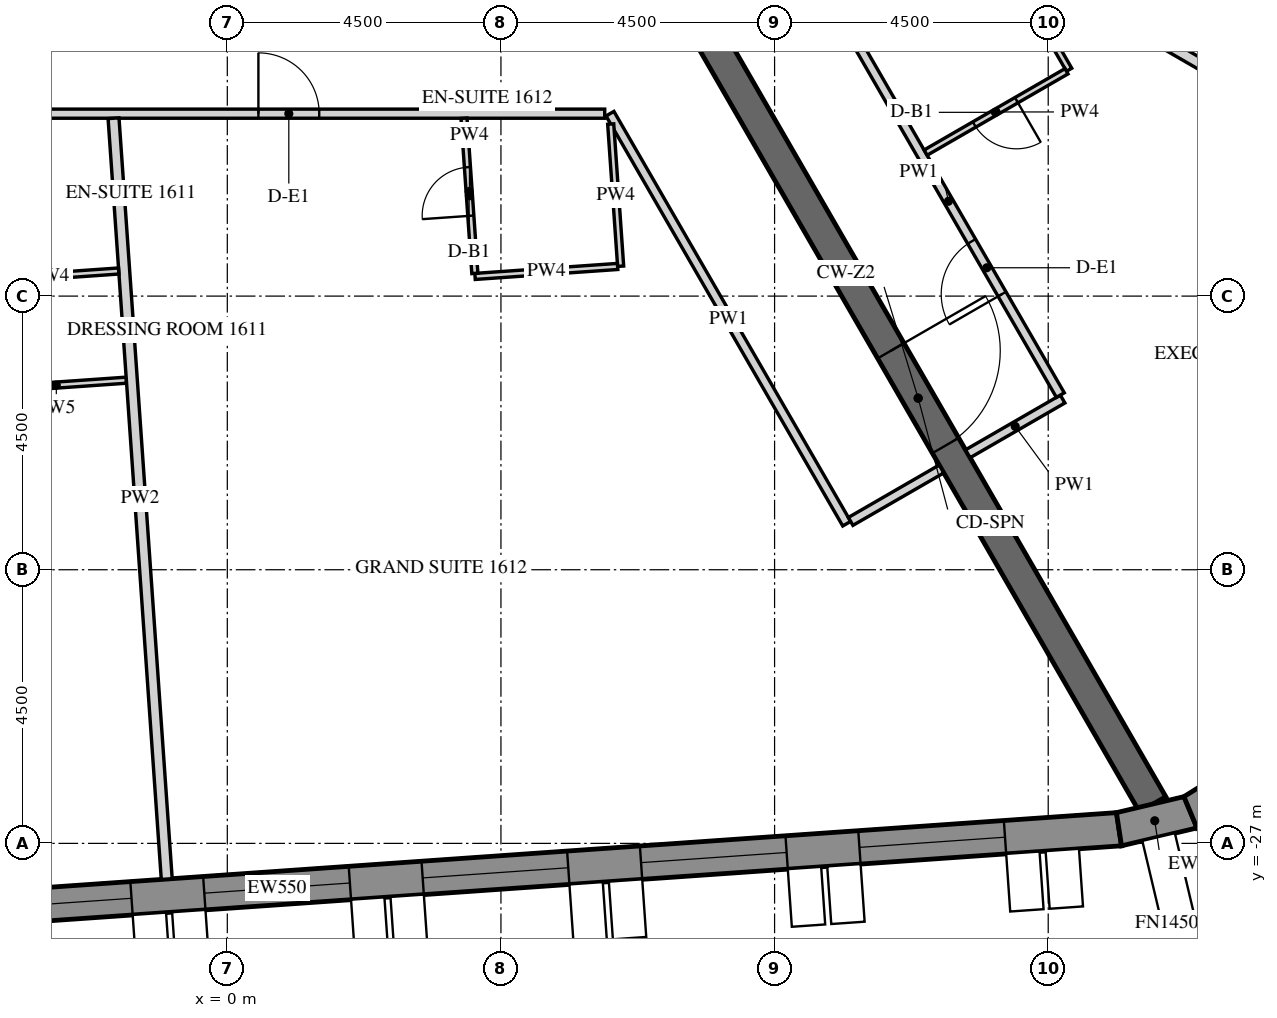
"""IFC4 building model, lengths in metres.
Left out: names, types, materials, properties, quantities, classifications, styles, units other than length and angle.
Written with IfcOpenShell. Run it as: python <this file> out.ifc"""

import sys

from ifc_helpers import new_model, si_unit, direction, frame, frame_2d, origin, place, context, subcontext, project, spatial, polyline, rectangle, outline, extrude, element, fill, save


model = new_model("IFC4")
c1 = context("Model", 3, precision=1e-05, world=origin(), true_north=direction((0.0, 1.0)))
c2 = subcontext(c1, "Body", "Model", "MODEL_VIEW")
j1 = project(units=[si_unit("LENGTHUNIT", "METRE"), si_unit("PLANEANGLEUNIT", "RADIAN")], contexts=[c1])
p1 = place(None, origin())
s1 = spatial("IfcSite", under=j1, at=p1, CompositionType="ELEMENT")
p2 = place(p1, origin())
s2 = spatial("IfcBuilding", under=s1, at=p2, CompositionType="ELEMENT")
p3 = place(p2, frame((0.0, 0.0, 207.3)))
s3 = spatial("IfcBuildingStorey", under=s2, at=p3, CompositionType="ELEMENT", Elevation=207.3)
p4 = place(p3, frame((-13.026, -28.704, -0.15), z_axis=(0.0, 0.0, 1.0), x_axis=(0.99756406806, 0.069756219185, 0.0)))
e1 = element("IfcWall", 1, at=p4, inside=s3, PredefinedType="SOLIDWALL", context=c2, shape_type="SweptSolid", body=[
    extrude(outline(polyline([(-0.026, -0.275), (27.78, -0.275), (27.735, 0.275), (0.026, 0.275), (-0.026, -0.275)])), origin(), (0.0, 0.0, 1.0), 3.9),
])
p5 = place(p4, frame((1.879, 0.0, 1.05)))
e2 = element("IfcOpeningElement", 2, at=p5, cuts=e1, PredefinedType="OPENING", context=c2, shape_type="SweptSolid", body=[
    extrude(rectangle(XDim=2.4, YDim=2.4, at=frame_2d((1.2, 1.2))), frame((0.0, 0.285, 0.0), z_axis=(0.0, -1.0, 0.0), x_axis=(1.0, 0.0, 0.0)), (0.0, 0.0, 1.0), 0.57),
])
p6 = place(p4, frame((5.479, 0.0, 1.05)))
e3 = element("IfcOpeningElement", 3, at=p6, cuts=e1, PredefinedType="OPENING", context=c2, shape_type="SweptSolid", body=[
    extrude(rectangle(XDim=2.4, YDim=2.4, at=frame_2d((1.2, 1.2))), frame((0.0, 0.285, 0.0), z_axis=(0.0, -1.0, 0.0), x_axis=(1.0, 0.0, 0.0)), (0.0, 0.0, 1.0), 0.57),
])
p7 = place(p4, frame((9.079, 0.0, 1.05)))
e4 = element("IfcOpeningElement", 4, at=p7, cuts=e1, PredefinedType="OPENING", context=c2, shape_type="SweptSolid", body=[
    extrude(rectangle(XDim=2.4, YDim=2.4, at=frame_2d((1.2, 1.2))), frame((0.0, 0.285, 0.0), z_axis=(0.0, -1.0, 0.0), x_axis=(1.0, 0.0, 0.0)), (0.0, 0.0, 1.0), 0.57),
])
p8 = place(p4, frame((12.679, 0.0, 1.05)))
e5 = element("IfcOpeningElement", 5, at=p8, cuts=e1, PredefinedType="OPENING", context=c2, shape_type="SweptSolid", body=[
    extrude(rectangle(XDim=2.4, YDim=2.4, at=frame_2d((1.2, 1.2))), frame((0.0, 0.285, 0.0), z_axis=(0.0, -1.0, 0.0), x_axis=(1.0, 0.0, 0.0)), (0.0, 0.0, 1.0), 0.57),
])
p9 = place(p4, frame((16.279, 0.0, 1.05)))
e6 = element("IfcOpeningElement", 6, at=p9, cuts=e1, PredefinedType="OPENING", context=c2, shape_type="SweptSolid", body=[
    extrude(rectangle(XDim=2.4, YDim=2.4, at=frame_2d((1.2, 1.2))), frame((0.0, 0.285, 0.0), z_axis=(0.0, -1.0, 0.0), x_axis=(1.0, 0.0, 0.0)), (0.0, 0.0, 1.0), 0.57),
])
p10 = place(p4, frame((19.879, 0.0, 1.05)))
e7 = element("IfcOpeningElement", 7, at=p10, cuts=e1, PredefinedType="OPENING", context=c2, shape_type="SweptSolid", body=[
    extrude(rectangle(XDim=2.4, YDim=2.4, at=frame_2d((1.2, 1.2))), frame((0.0, 0.285, 0.0), z_axis=(0.0, -1.0, 0.0), x_axis=(1.0, 0.0, 0.0)), (0.0, 0.0, 1.0), 0.57),
])
p11 = place(p4, frame((23.479, 0.0, 1.05)))
e8 = element("IfcOpeningElement", 8, at=p11, cuts=e1, PredefinedType="OPENING", context=c2, shape_type="SweptSolid", body=[
    extrude(rectangle(XDim=2.4, YDim=2.4, at=frame_2d((1.2, 1.2))), frame((0.0, 0.285, 0.0), z_axis=(0.0, -1.0, 0.0), x_axis=(1.0, 0.0, 0.0)), (0.0, 0.0, 1.0), 0.57),
])
p12 = place(p3, frame((14.664, -26.767, -0.15), z_axis=(0.0, 0.0, 1.0), x_axis=(0.973063591128, 0.230536868247, 0.0)))
e9 = element("IfcWall", 9, at=p12, inside=s3, PredefinedType="SOLIDWALL", context=c2, shape_type="SweptSolid", body=[
    extrude(outline(polyline([(-0.022, -0.275), (1.253, -0.275), (1.163, 0.275), (0.022, 0.275), (-0.022, -0.275)])), origin(), (0.0, 0.0, 1.0), 3.9),
])
p13 = place(p3, frame((15.84, -26.489, -0.15), z_axis=(0.0, 0.0, 1.0), x_axis=(0.848009655012, 0.52998077796, 0.0)))
e10 = element("IfcWall", 10, at=p13, inside=s3, PredefinedType="SOLIDWALL", context=c2, shape_type="SweptSolid", body=[
    extrude(outline(polyline([(-0.045, -0.275), (1.253, -0.275), (1.163, 0.275), (0.045, 0.275), (-0.045, -0.275)])), origin(), (0.0, 0.0, 1.0), 3.9),
])
p14 = place(p3, frame((7.506, -13.0, -0.15), z_axis=(0.0, 0.0, 1.0), x_axis=(0.499988271576, -0.866032175087, 0.0)))
e11 = element("IfcWall", 11, at=p14, inside=s3, PredefinedType="SHEAR", context=c2, shape_type="SweptSolid", body=[
    extrude(rectangle(XDim=15.424, YDim=0.5, at=frame_2d((7.712, 0.0))), origin(), (0.0, 0.0, 1.0), 3.9),
])
p15 = place(p14, frame((6.812, 0.0, 0.15)))
e12 = element("IfcOpeningElement", 12, at=p15, cuts=e11, PredefinedType="OPENING", context=c2, shape_type="SweptSolid", body=[
    extrude(rectangle(XDim=1.8, YDim=2.4, at=frame_2d((0.9, 1.2))), frame((0.0, 0.26, 0.0), z_axis=(0.0, -1.0, 0.0), x_axis=(1.0, 0.0, 0.0)), (0.0, 0.0, 1.0), 0.52),
])
p16 = place(p3, frame((-8.574, -15.0, 0.0), z_axis=(0.0, 0.0, 1.0), x_axis=(1.0, 0.0, 0.0)))
e13 = element("IfcWall", 13, at=p16, inside=s3, PredefinedType="PARTITIONING", context=c2, shape_type="SweptSolid", body=[
    extrude(rectangle(XDim=14.78, YDim=0.15, at=frame_2d((7.39, 0.0))), origin(), (0.0, 0.0, 1.0), 2.988),
])
p17 = place(p16, frame((1.951, 0.0, 0.0)))
e14 = element("IfcOpeningElement", 14, at=p17, cuts=e13, PredefinedType="OPENING", context=c2, shape_type="SweptSolid", body=[
    extrude(rectangle(XDim=1.0, YDim=2.1, at=frame_2d((0.5, 1.05))), frame((0.0, 0.085, 0.0), z_axis=(0.0, -1.0, 0.0), x_axis=(1.0, 0.0, 0.0)), (0.0, 0.0, 1.0), 0.17),
])
p18 = place(p16, frame((9.085, 0.0, 0.0)))
e15 = element("IfcOpeningElement", 15, at=p18, cuts=e13, PredefinedType="OPENING", context=c2, shape_type="SweptSolid", body=[
    extrude(rectangle(XDim=1.0, YDim=2.1, at=frame_2d((0.5, 1.05))), frame((0.0, 0.085, 0.0), z_axis=(0.0, -1.0, 0.0), x_axis=(1.0, 0.0, 0.0)), (0.0, 0.0, 1.0), 0.17),
])
p19 = place(p3, frame((6.293, -15.0, 0.0), z_axis=(0.0, 0.0, 1.0), x_axis=(0.499980313799, -0.86603676932, 0.0)))
e16 = element("IfcWall", 16, at=p19, inside=s3, PredefinedType="PARTITIONING", context=c2, shape_type="SweptSolid", body=[
    extrude(rectangle(XDim=7.786, YDim=0.15, at=frame_2d((3.893, 0.0))), origin(), (0.0, 0.0, 1.0), 2.988),
])
p20 = place(p3, frame((10.251, -21.705, 0.0), z_axis=(0.0, 0.0, 1.0), x_axis=(0.866013532718, 0.500020560727, 0.0)))
e17 = element("IfcWall", 17, at=p20, inside=s3, PredefinedType="PARTITIONING", context=c2, shape_type="SweptSolid", body=[
    extrude(rectangle(XDim=1.725, YDim=0.15, at=frame_2d((0.863, 0.0))), origin(), (0.0, 0.0, 1.0), 2.988),
])
p21 = place(p3, frame((12.178, -20.593, 0.0), z_axis=(0.0, 0.0, 1.0), x_axis=(0.866047807691, 0.499961193289, 0.0)))
e18 = element("IfcWall", 18, at=p21, inside=s3, PredefinedType="PARTITIONING", context=c2, shape_type="SweptSolid", body=[
    extrude(rectangle(XDim=1.8, YDim=0.15, at=frame_2d((0.9, 0.0))), origin(), (0.0, 0.0, 1.0), 2.988),
])
p22 = place(p3, frame((13.699, -19.628, 0.0), z_axis=(0.0, 0.0, 1.0), x_axis=(-0.499995202058, 0.86602817386, 0.0)))
e19 = element("IfcWall", 19, at=p22, inside=s3, PredefinedType="PARTITIONING", context=c2, shape_type="SweptSolid", body=[
    extrude(rectangle(XDim=7.361, YDim=0.15, at=frame_2d((3.68, 0.0))), origin(), (0.0, 0.0, 1.0), 2.988),
])
p23 = place(p22, frame((1.918, 0.0, 0.0)))
e20 = element("IfcOpeningElement", 20, at=p23, cuts=e19, PredefinedType="OPENING", context=c2, shape_type="SweptSolid", body=[
    extrude(rectangle(XDim=1.0, YDim=2.1, at=frame_2d((0.5, 1.05))), frame((0.0, 0.085, 0.0), z_axis=(0.0, -1.0, 0.0), x_axis=(1.0, 0.0, 0.0)), (0.0, 0.0, 1.0), 0.17),
])
p24 = place(p3, frame((-1.66, -19.383, 0.0), z_axis=(0.0, 0.0, 1.0), x_axis=(-0.997564338377, -0.069752353356, 0.0)))
e21 = element("IfcWall", 21, at=p24, inside=s3, PredefinedType="PARTITIONING", context=c2, shape_type="SweptSolid", body=[
    extrude(rectangle(XDim=2.31, YDim=0.1, at=frame_2d((1.155, 0.0))), origin(), (0.0, 0.0, 1.0), 2.988),
])
p25 = place(p3, frame((-0.996, -27.587, 0.0), z_axis=(0.0, 0.0, 1.0), x_axis=(-0.069744671963, 0.997564875451, 0.0)))
e22 = element("IfcWall", 22, at=p25, inside=s3, PredefinedType="PARTITIONING", context=c2, shape_type="SweptSolid", body=[
    extrude(rectangle(XDim=12.542, YDim=0.18, at=frame_2d((6.271, 0.0))), origin(), (0.0, 0.0, 1.0), 2.988),
])
p26 = place(p3, frame((-4.04, -17.745, 0.0), z_axis=(0.0, 0.0, 1.0), x_axis=(0.997562351999, 0.069780755754, 0.0)))
e23 = element("IfcWall", 23, at=p26, inside=s3, PredefinedType="PARTITIONING", context=c2, shape_type="SweptSolid", body=[
    extrude(rectangle(XDim=2.26, YDim=0.1, at=frame_2d((1.13, 0.0))), origin(), (0.0, 0.0, 1.0), 2.988),
])
p27 = place(p3, frame((6.305, -15.171, 0.0), z_axis=(0.0, 0.0, 1.0), x_axis=(0.06967780619, -0.997569548114, 0.0)))
e24 = element("IfcWall", 24, at=p27, inside=s3, PredefinedType="PARTITIONING", context=c2, shape_type="SweptSolid", body=[
    extrude(rectangle(XDim=2.344, YDim=0.1, at=frame_2d((1.172, 0.0))), origin(), (0.0, 0.0, 1.0), 2.988),
])
p28 = place(p3, frame((6.419, -17.512, 0.0), z_axis=(0.0, 0.0, 1.0), x_axis=(-0.997567210304, -0.069711268289, 0.0)))
e25 = element("IfcWall", 25, at=p28, inside=s3, PredefinedType="PARTITIONING", context=c2, shape_type="SweptSolid", body=[
    extrude(rectangle(XDim=2.35, YDim=0.1, at=frame_2d((1.175, 0.0))), origin(), (0.0, 0.0, 1.0), 2.988),
])
p29 = place(p3, frame((4.071, -17.626, 0.0), z_axis=(0.0, 0.0, 1.0), x_axis=(-0.06967999793, 0.997569395024, 0.0)))
e26 = element("IfcWall", 26, at=p29, inside=s3, PredefinedType="PARTITIONING", context=c2, shape_type="SweptSolid", body=[
    extrude(rectangle(XDim=2.558, YDim=0.1, at=frame_2d((1.279, 0.0))), origin(), (0.0, 0.0, 1.0), 2.988),
])
p30 = place(p29, frame((0.95, 0.0, 0.0)))
e27 = element("IfcOpeningElement", 27, at=p30, cuts=e26, PredefinedType="OPENING", context=c2, shape_type="SweptSolid", body=[
    extrude(rectangle(XDim=0.8, YDim=2.1, at=frame_2d((0.4, 1.05))), frame((0.0, 0.06, 0.0), z_axis=(0.0, -1.0, 0.0), x_axis=(1.0, 0.0, 0.0)), (0.0, 0.0, 1.0), 0.12),
])
p31 = place(p3, frame((12.772, -12.423, 0.0), z_axis=(0.0, 0.0, 1.0), x_axis=(0.500061136393, -0.865990103794, 0.0)))
e28 = element("IfcWall", 28, at=p31, inside=s3, PredefinedType="PARTITIONING", context=c2, shape_type="SweptSolid", body=[
    extrude(rectangle(XDim=2.142, YDim=0.1, at=frame_2d((1.071, 0.0))), origin(), (0.0, 0.0, 1.0), 2.988),
])
p32 = place(p3, frame((13.8, -14.303, 0.0), z_axis=(0.0, 0.0, 1.0), x_axis=(-0.866021425885, -0.500006889861, 0.0)))
e29 = element("IfcWall", 29, at=p32, inside=s3, PredefinedType="PARTITIONING", context=c2, shape_type="SweptSolid", body=[
    extrude(rectangle(XDim=2.675, YDim=0.1, at=frame_2d((1.337, 0.0))), origin(), (0.0, 0.0, 1.0), 2.988),
])
p33 = place(p32, frame((0.95, 0.0, 0.0)))
e30 = element("IfcOpeningElement", 30, at=p33, cuts=e29, PredefinedType="OPENING", context=c2, shape_type="SweptSolid", body=[
    extrude(rectangle(XDim=0.8, YDim=2.1, at=frame_2d((0.4, 1.05))), frame((0.0, 0.06, 0.0), z_axis=(0.0, -1.0, 0.0), x_axis=(1.0, 0.0, 0.0)), (0.0, 0.0, 1.0), 0.12),
])
p34 = place(p3, frame((21.631, -17.433, 0.0), z_axis=(0.0, 0.0, 1.0), x_axis=(-0.866029744906, 0.499992480882, 0.0)))
e31 = element("IfcWall", 31, at=p34, inside=s3, PredefinedType="PARTITIONING", context=c2, shape_type="SweptSolid", body=[
    extrude(rectangle(XDim=10.801, YDim=0.18, at=frame_2d((5.4, 0.0))), origin(), (0.0, 0.0, 1.0), 2.988),
])
p35 = place(p7, frame((0.0, 0.205, 0.0)))
e32 = element("IfcWindow", 32, at=p35, inside=s3, PartitioningType="DOUBLE_PANEL_VERTICAL", PredefinedType="WINDOW", context=c2, shape_type="SweptSolid", body=[
    extrude(rectangle(XDim=2.4, YDim=2.4, at=frame_2d((1.2, 1.2))), frame((0.0, 0.03, 0.0), z_axis=(0.0, -1.0, 0.0), x_axis=(1.0, 0.0, 0.0)), (0.0, 0.0, 1.0), 0.06),
])
fill(e4, e32)
p36 = place(p8, frame((0.0, 0.205, 0.0)))
e33 = element("IfcWindow", 33, at=p36, inside=s3, PartitioningType="DOUBLE_PANEL_VERTICAL", PredefinedType="WINDOW", context=c2, shape_type="SweptSolid", body=[
    extrude(rectangle(XDim=2.4, YDim=2.4, at=frame_2d((1.2, 1.2))), frame((0.0, 0.03, 0.0), z_axis=(0.0, -1.0, 0.0), x_axis=(1.0, 0.0, 0.0)), (0.0, 0.0, 1.0), 0.06),
])
fill(e5, e33)
p37 = place(p9, frame((0.0, 0.205, 0.0)))
e34 = element("IfcWindow", 34, at=p37, inside=s3, PartitioningType="DOUBLE_PANEL_VERTICAL", PredefinedType="WINDOW", context=c2, shape_type="SweptSolid", body=[
    extrude(rectangle(XDim=2.4, YDim=2.4, at=frame_2d((1.2, 1.2))), frame((0.0, 0.03, 0.0), z_axis=(0.0, -1.0, 0.0), x_axis=(1.0, 0.0, 0.0)), (0.0, 0.0, 1.0), 0.06),
])
fill(e6, e34)
p38 = place(p10, frame((0.0, 0.205, 0.0)))
e35 = element("IfcWindow", 35, at=p38, inside=s3, PartitioningType="DOUBLE_PANEL_VERTICAL", PredefinedType="WINDOW", context=c2, shape_type="SweptSolid", body=[
    extrude(rectangle(XDim=2.4, YDim=2.4, at=frame_2d((1.2, 1.2))), frame((0.0, 0.03, 0.0), z_axis=(0.0, -1.0, 0.0), x_axis=(1.0, 0.0, 0.0)), (0.0, 0.0, 1.0), 0.06),
])
fill(e7, e35)
p39 = place(p11, frame((0.0, 0.205, 0.0)))
e36 = element("IfcWindow", 36, at=p39, inside=s3, PartitioningType="DOUBLE_PANEL_VERTICAL", PredefinedType="WINDOW", context=c2, shape_type="SweptSolid", body=[
    extrude(rectangle(XDim=2.4, YDim=2.4, at=frame_2d((1.2, 1.2))), frame((0.0, 0.03, 0.0), z_axis=(0.0, -1.0, 0.0), x_axis=(1.0, 0.0, 0.0)), (0.0, 0.0, 1.0), 0.06),
])
fill(e8, e36)
p40 = place(p15, origin())
e37 = element("IfcDoor", 37, at=p40, inside=s3, OperationType="DOUBLE_DOOR_SINGLE_SWING", PredefinedType="DOOR", context=c2, shape_type="SweptSolid", body=[
    extrude(rectangle(XDim=1.8, YDim=2.4, at=frame_2d((0.9, 1.2))), frame((0.0, 0.025, 0.0), z_axis=(0.0, -1.0, 0.0), x_axis=(1.0, 0.0, 0.0)), (0.0, 0.0, 1.0), 0.05),
])
fill(e12, e37)
p41 = place(p18, origin())
e38 = element("IfcDoor", 38, at=p41, inside=s3, OperationType="SINGLE_SWING_RIGHT", PredefinedType="DOOR", context=c2, shape_type="SweptSolid", body=[
    extrude(rectangle(XDim=1.0, YDim=2.1, at=frame_2d((0.5, 1.05))), frame((0.0, 0.025, 0.0), z_axis=(0.0, -1.0, 0.0), x_axis=(1.0, 0.0, 0.0)), (0.0, 0.0, 1.0), 0.05),
])
fill(e15, e38)
p42 = place(p30, origin())
e39 = element("IfcDoor", 39, at=p42, inside=s3, OperationType="SINGLE_SWING_LEFT", PredefinedType="DOOR", context=c2, shape_type="SweptSolid", body=[
    extrude(rectangle(XDim=0.8, YDim=2.1, at=frame_2d((0.4, 1.05))), frame((0.0, 0.025, 0.0), z_axis=(0.0, -1.0, 0.0), x_axis=(1.0, 0.0, 0.0)), (0.0, 0.0, 1.0), 0.05),
])
fill(e27, e39)
p43 = place(p23, origin())
e40 = element("IfcDoor", 40, at=p43, inside=s3, OperationType="SINGLE_SWING_LEFT", PredefinedType="DOOR", context=c2, shape_type="SweptSolid", body=[
    extrude(rectangle(XDim=1.0, YDim=2.1, at=frame_2d((0.5, 1.05))), frame((0.0, 0.025, 0.0), z_axis=(0.0, -1.0, 0.0), x_axis=(1.0, 0.0, 0.0)), (0.0, 0.0, 1.0), 0.05),
])
fill(e20, e40)
p44 = place(p33, origin())
e41 = element("IfcDoor", 41, at=p44, inside=s3, OperationType="SINGLE_SWING_RIGHT", PredefinedType="DOOR", context=c2, shape_type="SweptSolid", body=[
    extrude(rectangle(XDim=0.8, YDim=2.1, at=frame_2d((0.4, 1.05))), frame((0.0, 0.025, 0.0), z_axis=(0.0, -1.0, 0.0), x_axis=(1.0, 0.0, 0.0)), (0.0, 0.0, 1.0), 0.05),
])
fill(e30, e41)
save(model, sys.argv[1])
